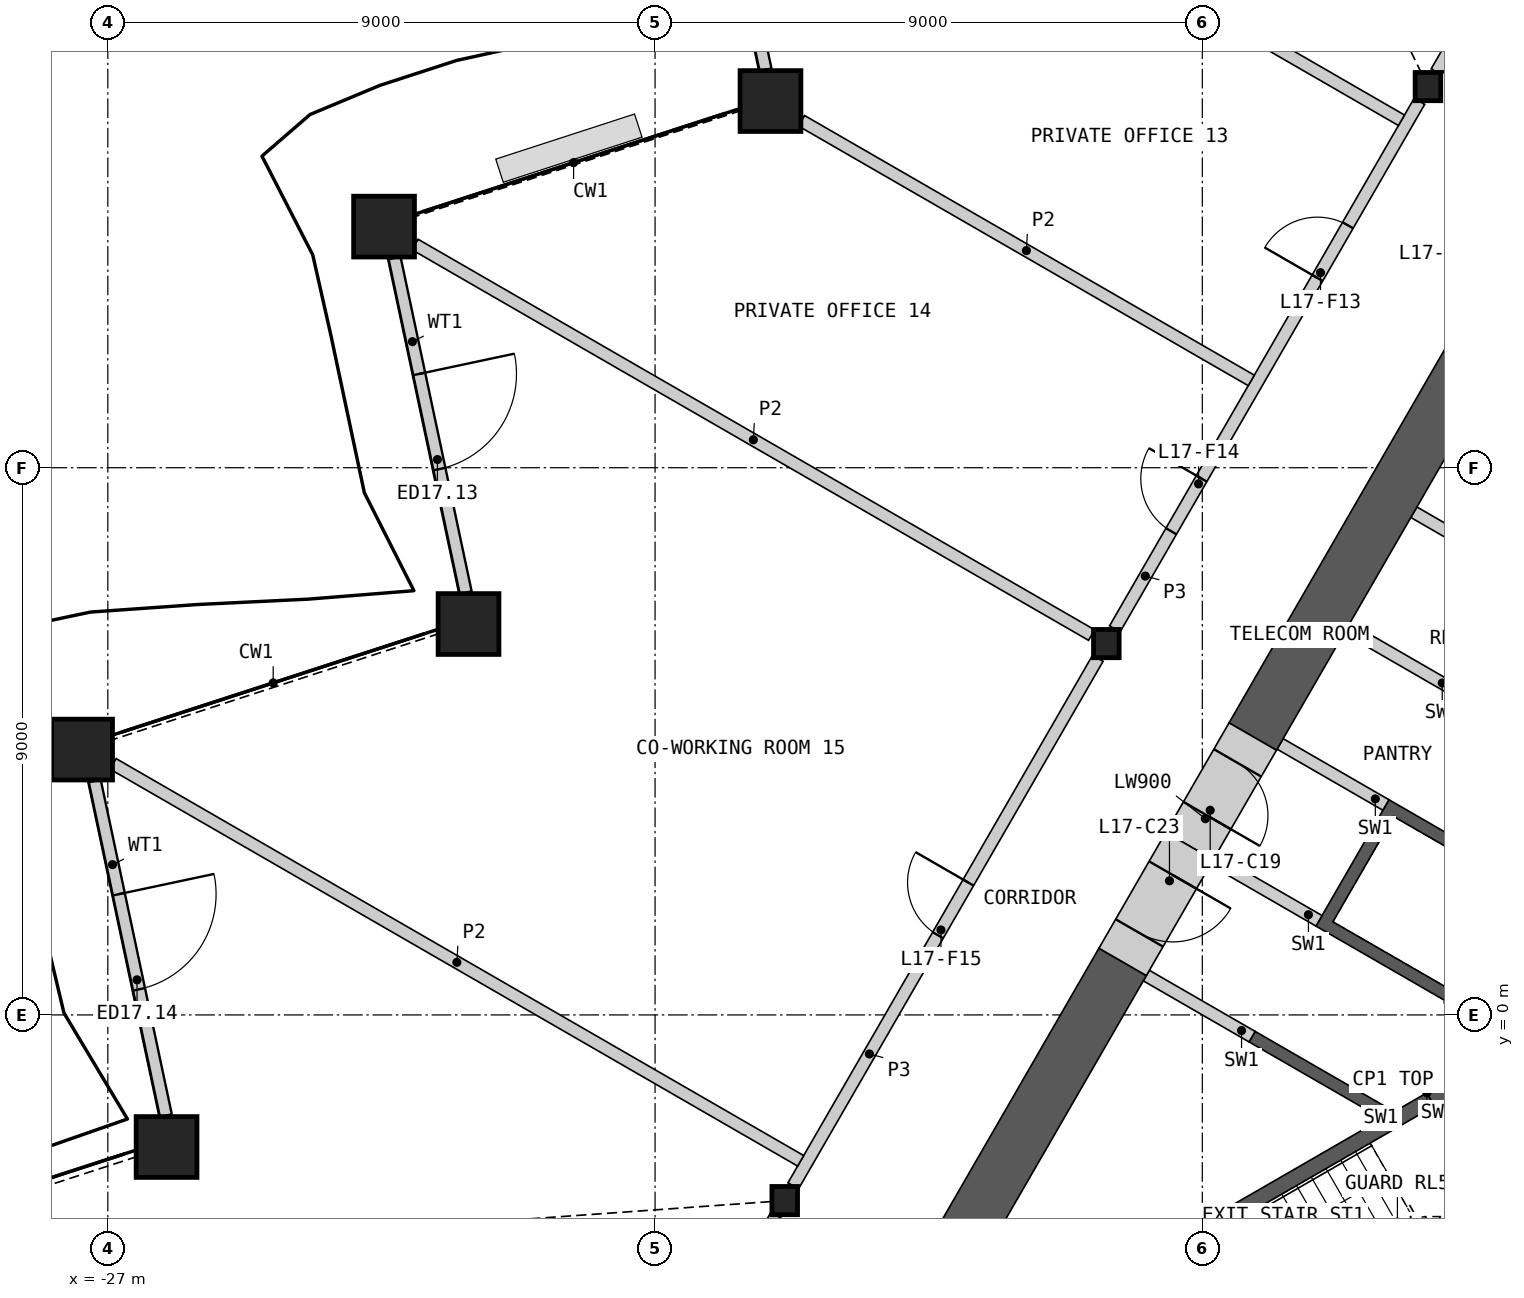
"""IFC4 building model, lengths in metres.
Left out: names, types, materials, properties, quantities, classifications, styles, units other than length and angle.
Written with IfcOpenShell. Run it as: python <this file> out.ifc"""

import sys

from ifc_helpers import new_model, si_unit, direction, frame, frame_2d, origin, origin_2d, place, context, subcontext, project, spatial, polyline, rectangle, hollow_rectangle, i_section, outline, extrude, element, fill, save


model = new_model("IFC4")
c1 = context("Model", 3, precision=1e-05, world=origin(), true_north=direction((0.0, 1.0)))
c2 = subcontext(c1, "Body", "Model", "MODEL_VIEW")
j1 = project(units=[si_unit("LENGTHUNIT", "METRE"), si_unit("PLANEANGLEUNIT", "RADIAN")], contexts=[c1])
p1 = place(None, origin())
s1 = spatial("IfcSite", under=j1, at=p1, CompositionType="ELEMENT")
p2 = place(p1, origin())
s2 = spatial("IfcBuilding", under=s1, at=p2, CompositionType="ELEMENT")
p3 = place(p2, frame((0.0, 0.0, 80.4)))
s3 = spatial("IfcBuildingStorey", under=s2, at=p3, CompositionType="ELEMENT", Elevation=80.4)
for number, where, z_axis, x_axis in (
    (1, (-16.102, 15.031, 0.0), (0.0, 0.0, 1.0), (1.0, 0.0, 0.0)),
    (2, (-22.457, 12.966, 0.0), (0.0, 0.0, 1.0), (1.0, 0.0, 0.0)),
    (3, (-21.068, 6.429, 0.0), (0.0, 0.0, 1.0), (1.0, 0.0, 0.0)),
    (4, (-27.423, 4.364, 0.0), (0.0, 0.0, 1.0), (1.0, 0.0, 0.0)),
    (5, (-26.034, -2.172, 0.0), (0.0, 0.0, 1.0), (1.0, 0.0, 0.0)),
):
    element("IfcColumn", number, at=place(p3, frame(where, z_axis=z_axis, x_axis=x_axis)), inside=s3, PredefinedType="COLUMN", context=c2, shape_type="SweptSolid", body=[
        extrude(hollow_rectangle(XDim=1.0, YDim=1.0, WallThickness=0.07, at=origin_2d()), origin(), (0.0, 0.0, 1.0), 4.2),
    ])
for number, where, z_axis, x_axis in (
    (6, (-5.289, 15.269, 0.0), (0.0, 0.0, 1.0), (1.0, 0.0, 0.0)),
    (7, (-10.578, 6.107, 0.0), (0.0, 0.0, 1.0), (1.0, 0.0, 0.0)),
    (8, (-15.868, -3.054, 0.0), (0.0, 0.0, 1.0), (1.0, 0.0, 0.0)),
):
    element("IfcColumn", number, at=place(p3, frame(where, z_axis=z_axis, x_axis=x_axis)), inside=s3, PredefinedType="COLUMN", context=c2, shape_type="SweptSolid", body=[
        extrude(i_section(OverallWidth=0.421, OverallDepth=0.465, WebThickness=0.045, FlangeThickness=0.072, at=origin_2d()), origin(), (0.0, 0.0, 1.0), 4.2),
    ])
p4 = place(p3, frame((-17.353, 21.051, 0.0), z_axis=(0.0, 0.0, 1.0), x_axis=(0.207901831982, -0.978149696242, 0.0)))
e9 = element("IfcWall", 9, at=p4, inside=s3, PredefinedType="SOLIDWALL", context=c2, shape_type="SweptSolid", body=[
    extrude(rectangle(XDim=5.626, YDim=0.2, at=frame_2d((2.813, 0.0))), origin(), (0.0, 0.0, 1.0), 3.189),
])
p5 = place(p4, frame((1.994, 0.0, 0.0)))
e10 = element("IfcOpeningElement", 10, at=p5, cuts=e9, PredefinedType="OPENING", context=c2, shape_type="SweptSolid", body=[
    extrude(rectangle(XDim=1.6, YDim=2.4, at=frame_2d((0.8, 1.2))), frame((0.0, 0.11, 0.0), z_axis=(0.0, -1.0, 0.0), x_axis=(1.0, 0.0, 0.0)), (0.0, 0.0, 1.0), 0.22),
])
p6 = place(p3, frame((-22.284, 12.449, 0.0), z_axis=(0.0, 0.0, 1.0), x_axis=(0.207943350029, -0.978140870825, 0.0)))
e11 = element("IfcWall", 11, at=p6, inside=s3, PredefinedType="SOLIDWALL", context=c2, shape_type="SweptSolid", body=[
    extrude(rectangle(XDim=5.626, YDim=0.2, at=frame_2d((2.813, 0.0))), origin(), (0.0, 0.0, 1.0), 3.189),
])
p7 = place(p6, frame((1.948, 0.0, 0.0)))
e12 = element("IfcOpeningElement", 12, at=p7, cuts=e11, PredefinedType="OPENING", context=c2, shape_type="SweptSolid", body=[
    extrude(rectangle(XDim=1.6, YDim=2.4, at=frame_2d((0.8, 1.2))), frame((0.0, 0.11, 0.0), z_axis=(0.0, -1.0, 0.0), x_axis=(1.0, 0.0, 0.0)), (0.0, 0.0, 1.0), 0.22),
])
p8 = place(p3, frame((-27.215, 3.848, 0.0), z_axis=(0.0, 0.0, 1.0), x_axis=(0.207901831982, -0.978149696242, 0.0)))
e13 = element("IfcWall", 13, at=p8, inside=s3, PredefinedType="SOLIDWALL", context=c2, shape_type="SweptSolid", body=[
    extrude(rectangle(XDim=5.626, YDim=0.2, at=frame_2d((2.813, 0.0))), origin(), (0.0, 0.0, 1.0), 3.189),
])
p9 = place(p8, frame((1.903, 0.0, 0.0)))
e14 = element("IfcOpeningElement", 14, at=p9, cuts=e13, PredefinedType="OPENING", context=c2, shape_type="SweptSolid", body=[
    extrude(rectangle(XDim=1.6, YDim=2.4, at=frame_2d((0.8, 1.2))), frame((0.0, 0.11, 0.0), z_axis=(0.0, -1.0, 0.0), x_axis=(1.0, 0.0, 0.0)), (0.0, 0.0, 1.0), 0.22),
])
p10 = place(p3, origin())
e15 = element("IfcWall", 15, at=p10, inside=s3, PredefinedType="SHEAR", context=c2, shape_type="SweptSolid", body=[
    extrude(outline(polyline([(-6.061, -1.697), (-8.231, -0.444), (-8.131, -0.271), (-5.96, -1.524), (-6.061, -1.697)])), origin(), (0.0, 0.0, 1.0), 3.8),
])
p11 = place(p3, origin())
e16 = element("IfcWall", 16, at=p11, inside=s3, PredefinedType="SHEAR", context=c2, shape_type="SweptSolid", body=[
    extrude(outline(polyline([(-4.96, 0.208), (-7.131, 1.461), (-5.931, 3.54), (-3.76, 2.287), (-3.861, 2.113), (-5.852, 3.263), (-6.852, 1.531), (-4.861, 0.381), (-4.96, 0.208)])), origin(), (0.0, 0.0, 1.0), 3.8),
])
p12 = place(p3, frame((-3.781, 7.263, 0.0), z_axis=(0.0, 0.0, 1.0), x_axis=(-0.865983199114, 0.50007309351, 0.0)))
e17 = element("IfcWall", 17, at=p12, inside=s3, PredefinedType="SHEAR", context=c2, shape_type="SweptSolid", body=[
    extrude(rectangle(XDim=2.009, YDim=0.2, at=frame_2d((1.004, 0.0))), origin(), (0.0, 0.0, 1.0), 3.8),
])
p13 = place(p3, frame((-4.881, 5.358, 0.0), z_axis=(0.0, 0.0, 1.0), x_axis=(-0.866035824272, 0.499981950752, 0.0)))
e18 = element("IfcWall", 18, at=p13, inside=s3, PredefinedType="SHEAR", context=c2, shape_type="SweptSolid", body=[
    extrude(rectangle(XDim=2.009, YDim=0.2, at=frame_2d((1.004, 0.0))), origin(), (0.0, 0.0, 1.0), 3.8),
])
p14 = place(p3, frame((-5.981, 3.453, 0.0), z_axis=(0.0, 0.0, 1.0), x_axis=(-0.866013584312, 0.500020471368, 0.0)))
e19 = element("IfcWall", 19, at=p14, inside=s3, PredefinedType="SHEAR", context=c2, shape_type="SweptSolid", body=[
    extrude(rectangle(XDim=2.009, YDim=0.2, at=frame_2d((1.005, 0.0))), origin(), (0.0, 0.0, 1.0), 3.8),
])
p15 = place(p3, frame((-7.081, 1.548, 0.0), z_axis=(0.0, 0.0, 1.0), x_axis=(-0.865983199114, 0.50007309351, 0.0)))
e20 = element("IfcWall", 20, at=p15, inside=s3, PredefinedType="SHEAR", context=c2, shape_type="SweptSolid", body=[
    extrude(rectangle(XDim=2.009, YDim=0.2, at=frame_2d((1.004, 0.0))), origin(), (0.0, 0.0, 1.0), 3.8),
])
p16 = place(p3, frame((-8.181, -0.357, 0.0), z_axis=(0.0, 0.0, 1.0), x_axis=(-0.866035824272, 0.499981950752, 0.0)))
e21 = element("IfcWall", 21, at=p16, inside=s3, PredefinedType="SHEAR", context=c2, shape_type="SweptSolid", body=[
    extrude(rectangle(XDim=2.009, YDim=0.2, at=frame_2d((1.004, 0.0))), origin(), (0.0, 0.0, 1.0), 3.8),
])
p17 = place(p3, origin())
e22 = element("IfcWall", 22, at=p17, inside=s3, PredefinedType="SHEAR", context=c2, shape_type="SweptSolid", body=[
    extrude(outline(polyline([(-5.307, -1.281), (-10.374, -4.206), (-10.032, -4.298), (-5.182, -1.498), (-5.307, -1.281)])), origin(), (0.0, 0.0, 1.0), 3.8),
])
p18 = place(p3, frame((-5.199, -1.219, 0.0), z_axis=(0.0, 0.0, 1.0), x_axis=(0.499982516597, -0.866035497597, 0.0)))
e23 = element("IfcWall", 23, at=p18, inside=s3, PredefinedType="SHEAR", context=c2, shape_type="SweptSolid", body=[
    extrude(rectangle(XDim=3.088, YDim=0.25, at=frame_2d((1.544, 0.0))), origin(), (0.0, 0.0, 1.0), 3.8),
])
p19 = place(p18, frame((0.994, 0.0, 0.0)))
e24 = element("IfcOpeningElement", 24, at=p19, cuts=e23, PredefinedType="OPENING", context=c2, shape_type="SweptSolid", body=[
    extrude(rectangle(XDim=1.1, YDim=2.1, at=frame_2d((0.55, 1.05))), frame((0.0, 0.135, 0.0), z_axis=(0.0, -1.0, 0.0), x_axis=(1.0, 0.0, 0.0)), (0.0, 0.0, 1.0), 0.27),
])
p20 = place(p3, frame((-10.31, 0.872, 0.0), z_axis=(0.0, 0.0, 1.0), x_axis=(-0.499991697393, -0.866030197244, 0.0)))
e25 = element("IfcWall", 25, at=p20, inside=s3, PredefinedType="SHEAR", context=c2, shape_type="SweptSolid", body=[
    extrude(rectangle(XDim=11.041, YDim=0.9, at=frame_2d((5.521, 0.0))), origin(), (0.0, 0.0, 1.0), 3.8),
])
p21 = place(p3, frame((-4.514, 10.911, 0.0), z_axis=(0.0, 0.0, 1.0), x_axis=(-0.500006662879, -0.866021556935, 0.0)))
e26 = element("IfcWall", 26, at=p21, inside=s3, PredefinedType="SHEAR", context=c2, shape_type="SweptSolid", body=[
    extrude(rectangle(XDim=7.312, YDim=0.9, at=frame_2d((3.656, 0.0))), origin(), (0.0, 0.0, 1.0), 3.8),
])
p22 = place(p3, frame((-8.17, 4.579, 0.0), z_axis=(0.0, 0.0, 1.0), x_axis=(-0.499888406853, -0.866089822532, 0.0)))
e27 = element("IfcWall", 27, at=p22, inside=s3, PredefinedType="SHEAR", context=c2, shape_type="SweptSolid", body=[
    extrude(rectangle(XDim=2.08, YDim=0.9, at=frame_2d((1.04, 0.0))), origin(), (0.0, 0.0, 1.0), 3.8),
])
p23 = place(p22, frame((0.5, 0.0, 0.0)))
e28 = element("IfcOpeningElement", 28, at=p23, cuts=e27, PredefinedType="OPENING", context=c2, shape_type="SweptSolid", body=[
    extrude(rectangle(XDim=1.0, YDim=2.1, at=frame_2d((0.5, 1.05))), frame((0.0, 0.46, 0.0), z_axis=(0.0, -1.0, 0.0), x_axis=(1.0, 0.0, 0.0)), (0.0, 0.0, 1.0), 0.92),
])
p24 = place(p3, frame((-9.21, 2.777, 0.0), z_axis=(0.0, 0.0, 1.0), x_axis=(-0.500077893725, -0.86598042715, 0.0)))
e29 = element("IfcWall", 29, at=p24, inside=s3, PredefinedType="SHEAR", context=c2, shape_type="SweptSolid", body=[
    extrude(rectangle(XDim=2.2, YDim=0.9, at=frame_2d((1.1, 0.0))), origin(), (0.0, 0.0, 1.0), 3.8),
])
p25 = place(p24, frame((0.55, 0.0, 0.0)))
e30 = element("IfcOpeningElement", 30, at=p25, cuts=e29, PredefinedType="OPENING", context=c2, shape_type="SweptSolid", body=[
    extrude(rectangle(XDim=1.1, YDim=2.1, at=frame_2d((0.55, 1.05))), frame((0.0, 0.46, 0.0), z_axis=(0.0, -1.0, 0.0), x_axis=(1.0, 0.0, 0.0)), (0.0, 0.0, 1.0), 0.92),
])
p26 = place(p3, frame((-15.728, -2.811, 0.0), z_axis=(0.0, 0.0, 1.0), x_axis=(0.49999175339, 0.866030164915, 0.0)))
e31 = element("IfcWall", 31, at=p26, inside=s3, PredefinedType="PARTITIONING", context=c2, shape_type="SweptSolid", body=[
    extrude(rectangle(XDim=10.019, YDim=0.2, at=frame_2d((5.009, 0.0))), origin(), (0.0, 0.0, 1.0), 3.8),
])
p27 = place(p26, frame((4.76, 0.0, 0.0)))
e32 = element("IfcOpeningElement", 32, at=p27, cuts=e31, PredefinedType="OPENING", context=c2, shape_type="SweptSolid", body=[
    extrude(rectangle(XDim=1.0, YDim=2.1, at=frame_2d((0.5, 1.05))), frame((0.0, 0.11, 0.0), z_axis=(0.0, -1.0, 0.0), x_axis=(1.0, 0.0, 0.0)), (0.0, 0.0, 1.0), 0.22),
])
p28 = place(p3, frame((-10.439, 6.35, 0.0), z_axis=(0.0, 0.0, 1.0), x_axis=(0.50001002959, 0.86601961312, 0.0)))
e33 = element("IfcWall", 33, at=p28, inside=s3, PredefinedType="PARTITIONING", context=c2, shape_type="SweptSolid", body=[
    extrude(rectangle(XDim=10.019, YDim=0.2, at=frame_2d((5.009, 0.0))), origin(), (0.0, 0.0, 1.0), 3.8),
])
p29 = place(p28, frame((6.664, 0.0, 0.0)))
e34 = element("IfcOpeningElement", 34, at=p29, cuts=e33, PredefinedType="OPENING", context=c2, shape_type="SweptSolid", body=[
    extrude(rectangle(XDim=1.0, YDim=2.1, at=frame_2d((0.5, 1.05))), frame((0.0, 0.11, 0.0), z_axis=(0.0, -1.0, 0.0), x_axis=(1.0, 0.0, 0.0)), (0.0, 0.0, 1.0), 0.22),
])
p30 = place(p28, frame((1.854, 0.0, 0.0)))
e35 = element("IfcOpeningElement", 35, at=p30, cuts=e33, PredefinedType="OPENING", context=c2, shape_type="SweptSolid", body=[
    extrude(rectangle(XDim=1.0, YDim=2.1, at=frame_2d((0.5, 1.05))), frame((0.0, 0.11, 0.0), z_axis=(0.0, -1.0, 0.0), x_axis=(1.0, 0.0, 0.0)), (0.0, 0.0, 1.0), 0.22),
])
p31 = place(p3, frame((-5.149, 15.511, 0.0), z_axis=(0.0, 0.0, 1.0), x_axis=(0.500001069878, 0.866024786089, 0.0)))
e36 = element("IfcWall", 36, at=p31, inside=s3, PredefinedType="PARTITIONING", context=c2, shape_type="SweptSolid", body=[
    extrude(rectangle(XDim=6.473, YDim=0.2, at=frame_2d((3.236, 0.0))), origin(), (0.0, 0.0, 1.0), 3.8),
])
p32 = place(p31, frame((4.715, 0.0, 0.0)))
e37 = element("IfcOpeningElement", 37, at=p32, cuts=e36, PredefinedType="OPENING", context=c2, shape_type="SweptSolid", body=[
    extrude(rectangle(XDim=1.0, YDim=2.1, at=frame_2d((0.5, 1.05))), frame((0.0, 0.11, 0.0), z_axis=(0.0, -1.0, 0.0), x_axis=(1.0, 0.0, 0.0)), (0.0, 0.0, 1.0), 0.22),
])
p33 = place(p31, frame((1.468, 0.0, 0.0)))
e38 = element("IfcOpeningElement", 38, at=p33, cuts=e36, PredefinedType="OPENING", context=c2, shape_type="SweptSolid", body=[
    extrude(rectangle(XDim=1.0, YDim=2.1, at=frame_2d((0.5, 1.05))), frame((0.0, 0.11, 0.0), z_axis=(0.0, -1.0, 0.0), x_axis=(1.0, 0.0, 0.0)), (0.0, 0.0, 1.0), 0.22),
])
p34 = place(p3, frame((-19.244, -8.902, 0.0), z_axis=(0.0, 0.0, 1.0), x_axis=(0.499984737558, 0.86603421538, 0.0)))
e39 = element("IfcWall", 39, at=p34, inside=s3, PredefinedType="PARTITIONING", context=c2, shape_type="SweptSolid", body=[
    extrude(rectangle(XDim=6.473, YDim=0.2, at=frame_2d((3.236, 0.0))), origin(), (0.0, 0.0, 1.0), 3.8),
])
p35 = place(p34, frame((2.787, 0.0, 0.0)))
e40 = element("IfcOpeningElement", 40, at=p35, cuts=e39, PredefinedType="OPENING", context=c2, shape_type="SweptSolid", body=[
    extrude(rectangle(XDim=1.0, YDim=2.1, at=frame_2d((0.5, 1.05))), frame((0.0, 0.11, 0.0), z_axis=(0.0, -1.0, 0.0), x_axis=(1.0, 0.0, 0.0)), (0.0, 0.0, 1.0), 0.22),
])
p36 = place(p3, frame((-26.913, 4.129, 0.0), z_axis=(0.0, 0.0, 1.0), x_axis=(0.866026475891, -0.499998143053, 0.0)))
e41 = element("IfcWall", 41, at=p36, inside=s3, PredefinedType="PARTITIONING", context=c2, shape_type="SweptSolid", body=[
    extrude(rectangle(XDim=13.057, YDim=0.2, at=frame_2d((6.529, 0.0))), origin(), (0.0, 0.0, 1.0), 2.885),
])
p37 = place(p3, frame((-16.981, 21.213, 0.0), z_axis=(0.0, 0.0, 1.0), x_axis=(0.866032633092, -0.499987478263, 0.0)))
e42 = element("IfcWall", 42, at=p37, inside=s3, PredefinedType="PARTITIONING", context=c2, shape_type="SweptSolid", body=[
    extrude(rectangle(XDim=12.998, YDim=0.2, at=frame_2d((6.499, 0.0))), origin(), (0.0, 0.0, 1.0), 2.885),
])
p38 = place(p3, frame((-21.947, 12.671, 0.0), z_axis=(0.0, 0.0, 1.0), x_axis=(0.866026729935, -0.499997703033, 0.0)))
e43 = element("IfcWall", 43, at=p38, inside=s3, PredefinedType="PARTITIONING", context=c2, shape_type="SweptSolid", body=[
    extrude(rectangle(XDim=12.848, YDim=0.2, at=frame_2d((6.424, 0.0))), origin(), (0.0, 0.0, 1.0), 2.885),
])
p39 = place(p3, frame((-15.592, 14.707, 0.0), z_axis=(0.0, 0.0, 1.0), x_axis=(0.866032315796, -0.499988027854, 0.0)))
e44 = element("IfcWall", 44, at=p39, inside=s3, PredefinedType="PARTITIONING", context=c2, shape_type="SweptSolid", body=[
    extrude(rectangle(XDim=8.541, YDim=0.2, at=frame_2d((4.271, 0.0))), origin(), (0.0, 0.0, 1.0), 2.885),
])
p40 = place(p7, origin())
e45 = element("IfcDoor", 45, at=p40, inside=s3, OperationType="DOUBLE_DOOR_SINGLE_SWING", PredefinedType="DOOR", context=c2, shape_type="SweptSolid", body=[
    extrude(rectangle(XDim=1.6, YDim=2.4, at=frame_2d((0.8, 1.2))), frame((0.0, 0.025, 0.0), z_axis=(0.0, -1.0, 0.0), x_axis=(1.0, 0.0, 0.0)), (0.0, 0.0, 1.0), 0.05),
])
fill(e12, e45)
p41 = place(p9, origin())
e46 = element("IfcDoor", 46, at=p41, inside=s3, OperationType="DOUBLE_DOOR_SINGLE_SWING", PredefinedType="DOOR", context=c2, shape_type="SweptSolid", body=[
    extrude(rectangle(XDim=1.6, YDim=2.4, at=frame_2d((0.8, 1.2))), frame((0.0, 0.025, 0.0), z_axis=(0.0, -1.0, 0.0), x_axis=(1.0, 0.0, 0.0)), (0.0, 0.0, 1.0), 0.05),
])
fill(e14, e46)
p42 = place(p23, origin())
e47 = element("IfcDoor", 47, at=p42, inside=s3, OperationType="SINGLE_SWING_RIGHT", PredefinedType="DOOR", context=c2, shape_type="SweptSolid", body=[
    extrude(rectangle(XDim=1.0, YDim=2.1, at=frame_2d((0.5, 1.05))), frame((0.0, 0.205, 0.0), z_axis=(0.0, -1.0, 0.0), x_axis=(1.0, 0.0, 0.0)), (0.0, 0.0, 1.0), 0.05),
])
fill(e28, e47)
p43 = place(p25, origin())
e48 = element("IfcDoor", 48, at=p43, inside=s3, OperationType="SINGLE_SWING_LEFT", PredefinedType="DOOR", context=c2, shape_type="SweptSolid", body=[
    extrude(rectangle(XDim=1.1, YDim=2.1, at=frame_2d((0.55, 1.05))), frame((0.0, 0.205, 0.0), z_axis=(0.0, -1.0, 0.0), x_axis=(1.0, 0.0, 0.0)), (0.0, 0.0, 1.0), 0.05),
])
fill(e30, e48)
p44 = place(p29, origin())
e49 = element("IfcDoor", 49, at=p44, inside=s3, OperationType="SINGLE_SWING_LEFT", PredefinedType="DOOR", context=c2, shape_type="SweptSolid", body=[
    extrude(rectangle(XDim=1.0, YDim=2.1, at=frame_2d((0.5, 1.05))), frame((0.0, 0.025, 0.0), z_axis=(0.0, -1.0, 0.0), x_axis=(1.0, 0.0, 0.0)), (0.0, 0.0, 1.0), 0.05),
])
fill(e34, e49)
p45 = place(p30, origin())
e50 = element("IfcDoor", 50, at=p45, inside=s3, OperationType="SINGLE_SWING_RIGHT", PredefinedType="DOOR", context=c2, shape_type="SweptSolid", body=[
    extrude(rectangle(XDim=1.0, YDim=2.1, at=frame_2d((0.5, 1.05))), frame((0.0, 0.025, 0.0), z_axis=(0.0, -1.0, 0.0), x_axis=(1.0, 0.0, 0.0)), (0.0, 0.0, 1.0), 0.05),
])
fill(e35, e50)
p46 = place(p27, origin())
e51 = element("IfcDoor", 51, at=p46, inside=s3, OperationType="SINGLE_SWING_RIGHT", PredefinedType="DOOR", context=c2, shape_type="SweptSolid", body=[
    extrude(rectangle(XDim=1.0, YDim=2.1, at=frame_2d((0.5, 1.05))), frame((0.0, 0.025, 0.0), z_axis=(0.0, -1.0, 0.0), x_axis=(1.0, 0.0, 0.0)), (0.0, 0.0, 1.0), 0.05),
])
fill(e32, e51)
save(model, sys.argv[1])
